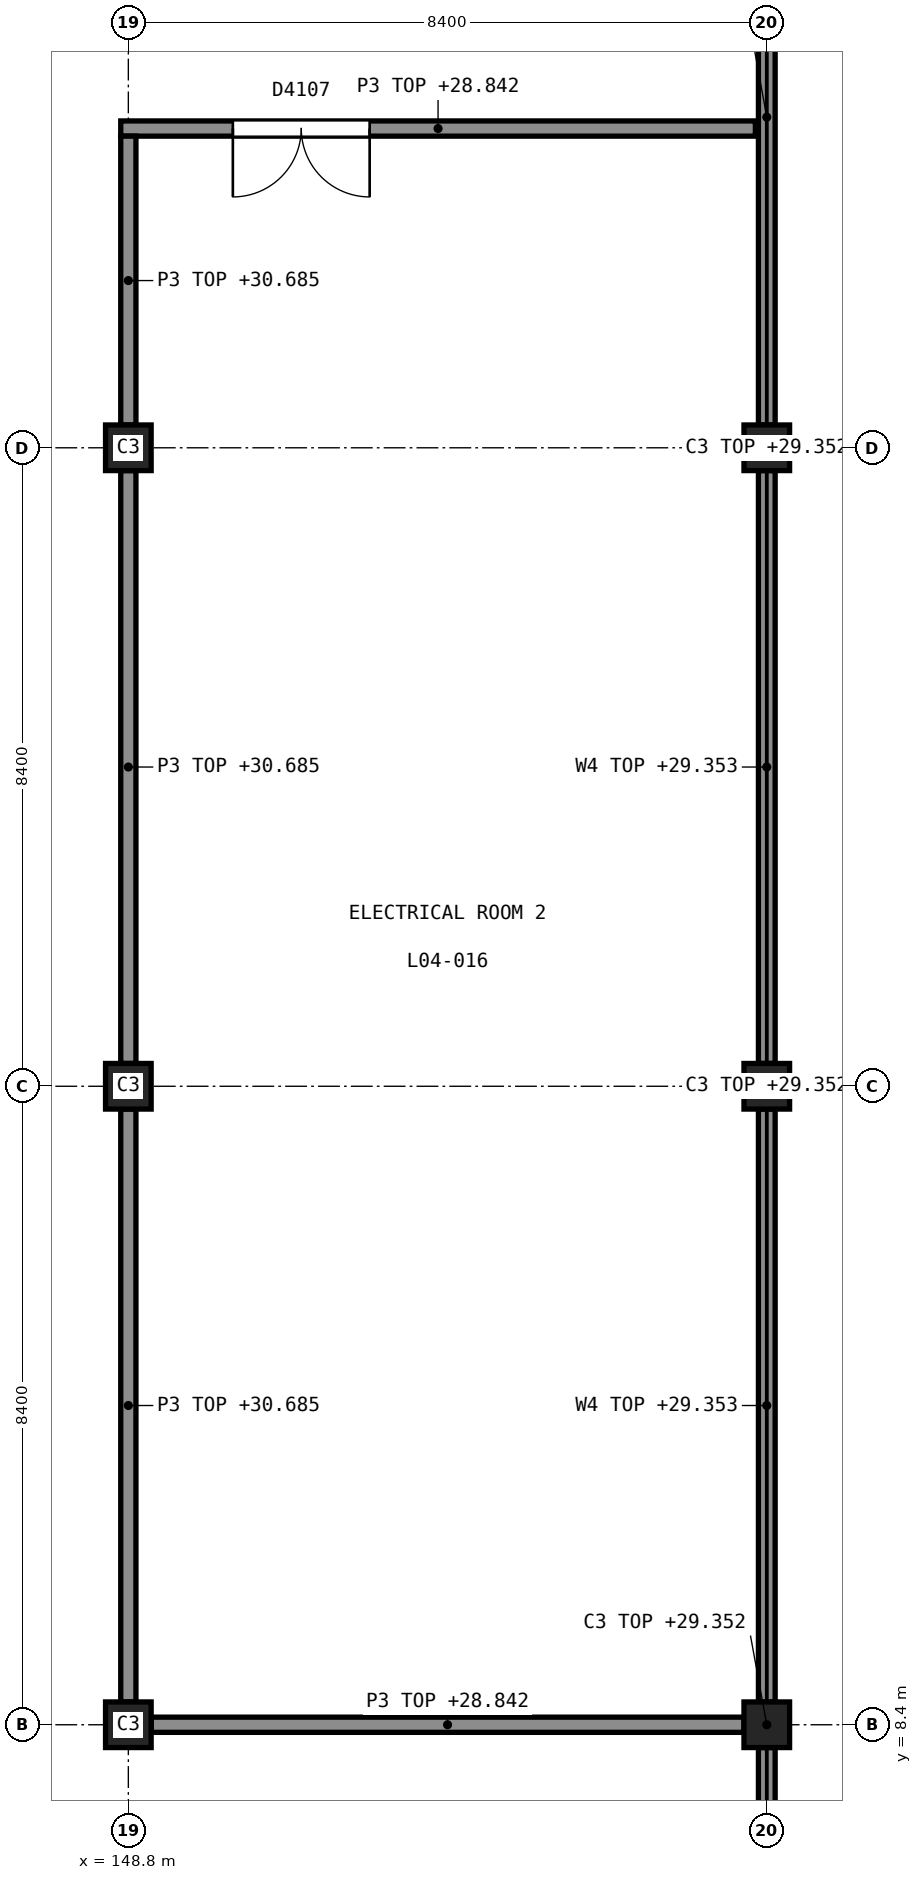
"""IFC4 building model, lengths in metres.
Left out: names, types, materials, properties, quantities, classifications, styles, units other than length and angle.
Written with IfcOpenShell. Run it as: python <this file> out.ifc"""

import sys

from ifc_helpers import new_model, si_unit, direction, frame, frame_2d, origin, origin_2d, place, context, subcontext, project, spatial, polyline, rectangle, outline, extrude, element, fill, save


model = new_model("IFC4")
c1 = context("Model", 3, precision=1e-05, world=origin(), true_north=direction((0.0, 1.0)))
c2 = subcontext(c1, "Body", "Model", "MODEL_VIEW")
j1 = project(units=[si_unit("LENGTHUNIT", "METRE"), si_unit("PLANEANGLEUNIT", "RADIAN")], contexts=[c1])
p1 = place(None, origin())
s1 = spatial("IfcSite", under=j1, at=p1, CompositionType="ELEMENT")
p2 = place(p1, origin())
s2 = spatial("IfcBuilding", under=s1, at=p2, CompositionType="ELEMENT")
p3 = place(p2, frame((0.0, 0.0, 25.0)))
s3 = spatial("IfcBuildingStorey", under=s2, at=p3, CompositionType="ELEMENT", Elevation=25.0)
for number, where, z_axis, x_axis in (
    (1, (148.8, 8.4, 0.0), (0.0, 0.0, 1.0), (1.0, 0.0, 0.0)),
    (2, (148.8, 16.8, 0.0), (0.0, 0.0, 1.0), (1.0, 0.0, 0.0)),
    (3, (148.8, 25.2, 0.0), (0.0, 0.0, 1.0), (1.0, 0.0, 0.0)),
):
    element("IfcColumn", number, at=place(p3, frame(where, z_axis=z_axis, x_axis=x_axis)), inside=s3, PredefinedType="COLUMN", context=c2, shape_type="SweptSolid", body=[
        extrude(rectangle(XDim=0.6, YDim=0.6, at=origin_2d()), origin(), (0.0, 0.0, 1.0), 5.0),
    ])
for number, where, z_axis, x_axis in (
    (4, (157.2, 8.4, 0.0), (0.0, 0.0, 1.0), (1.0, 0.0, 0.0)),
    (5, (157.2, 16.8, 0.0), (0.0, 0.0, 1.0), (1.0, 0.0, 0.0)),
    (6, (157.2, 25.2, 0.0), (0.0, 0.0, 1.0), (1.0, 0.0, 0.0)),
):
    element("IfcColumn", number, at=place(p3, frame(where, z_axis=z_axis, x_axis=x_axis)), inside=s3, PredefinedType="COLUMN", context=c2, shape_type="SweptSolid", body=[
        extrude(rectangle(XDim=0.6, YDim=0.6, at=origin_2d()), origin(), (0.0, 0.0, 1.0), 4.353),
    ])
for number, where, z_axis, x_axis in (
    (7, (157.2, 0.3, 0.0), (0.0, 0.0, 1.0), (0.0, 1.0, 0.0)),
    (8, (157.2, 8.7, 0.0), (0.0, 0.0, 1.0), (0.0, 1.0, 0.0)),
):
    element("IfcWall", number, at=place(p3, frame(where, z_axis=z_axis, x_axis=x_axis)), inside=s3, PredefinedType="SOLIDWALL", context=c2, shape_type="SweptSolid", body=[
        extrude(rectangle(XDim=7.8, YDim=0.22, at=frame_2d((3.9, 0.0))), origin(), (0.0, 0.0, 1.0), 4.353),
    ])
p4 = place(p3, frame((157.2, 17.1, 0.0), z_axis=(0.0, 0.0, 1.0), x_axis=(0.0, 1.0, 0.0)))
e9 = element("IfcWall", 9, at=p4, inside=s3, PredefinedType="SOLIDWALL", context=c2, shape_type="SweptSolid", body=[
    extrude(rectangle(XDim=7.8, YDim=0.22, at=frame_2d((3.9, 0.0))), origin(), (0.0, 0.0, 1.0), 4.353),
])
p5 = place(p3, frame((157.2, 25.5, 0.0), z_axis=(0.0, 0.0, 1.0), x_axis=(0.0, 1.0, 0.0)))
e10 = element("IfcWall", 10, at=p5, inside=s3, PredefinedType="SOLIDWALL", context=c2, shape_type="SweptSolid", body=[
    extrude(rectangle(XDim=8.1, YDim=0.22, at=frame_2d((4.05, 0.0))), origin(), (0.0, 0.0, 1.0), 4.353),
])
p6 = place(p3, frame((148.7, 29.4, 0.0), z_axis=(0.0, 0.0, 1.0), x_axis=(1.0, 0.0, 0.0)))
e11 = element("IfcWall", 11, at=p6, inside=s3, PredefinedType="PARTITIONING", context=c2, shape_type="SweptSolid", body=[
    extrude(rectangle(XDim=8.35, YDim=0.2, at=frame_2d((4.175, 0.0))), origin(), (0.0, 0.0, 1.0), 3.842),
])
p7 = place(p6, frame((1.475, 0.0, 0.0)))
e12 = element("IfcOpeningElement", 12, at=p7, cuts=e11, PredefinedType="OPENING", context=c2, shape_type="SweptSolid", body=[
    extrude(rectangle(XDim=1.8, YDim=2.1, at=frame_2d((0.9, 1.05))), frame((0.0, 0.11, 0.0), z_axis=(0.0, -1.0, 0.0), x_axis=(1.0, 0.0, 0.0)), (0.0, 0.0, 1.0), 0.22),
])
p8 = place(p3, frame((149.1, 8.4, 0.0), z_axis=(0.0, 0.0, 1.0), x_axis=(1.0, 0.0, 0.0)))
e13 = element("IfcWall", 13, at=p8, inside=s3, PredefinedType="PARTITIONING", context=c2, shape_type="SweptSolid", body=[
    extrude(rectangle(XDim=7.8, YDim=0.2, at=frame_2d((3.9, 0.0))), origin(), (0.0, 0.0, 1.0), 3.842),
])
p9 = place(p3, frame((148.8, 8.7, 0.0), z_axis=(0.0, 0.0, 1.0), x_axis=(0.0, 1.0, 0.0)))
e14 = element("IfcWall", 14, at=p9, inside=s3, PredefinedType="PARTITIONING", context=c2, shape_type="SweptSolid", body=[
    extrude(outline(polyline([(0.0, 0.0), (7.8, 0.0), (7.8, 5.685), (6.3, 5.685), (5.25, 3.842), (4.2, 5.685), (2.1, 5.685), (1.05, 3.842), (0.0, 5.685), (0.0, 0.0)])), frame((0.0, 0.1, 0.0), z_axis=(0.0, -1.0, 0.0), x_axis=(1.0, 0.0, 0.0)), (0.0, 0.0, 1.0), 0.2),
])
p10 = place(p3, frame((148.8, 17.1, 0.0), z_axis=(0.0, 0.0, 1.0), x_axis=(0.0, 1.0, 0.0)))
e15 = element("IfcWall", 15, at=p10, inside=s3, PredefinedType="PARTITIONING", context=c2, shape_type="SweptSolid", body=[
    extrude(outline(polyline([(0.0, 0.0), (7.8, 0.0), (7.8, 5.685), (6.3, 5.685), (5.25, 3.842), (4.2, 5.685), (2.1, 5.685), (1.05, 3.842), (0.0, 5.685), (0.0, 0.0)])), frame((0.0, 0.1, 0.0), z_axis=(0.0, -1.0, 0.0), x_axis=(1.0, 0.0, 0.0)), (0.0, 0.0, 1.0), 0.2),
])
p11 = place(p3, frame((148.8, 25.5, 0.0), z_axis=(0.0, 0.0, 1.0), x_axis=(0.0, 1.0, 0.0)))
e16 = element("IfcWall", 16, at=p11, inside=s3, PredefinedType="PARTITIONING", context=c2, shape_type="SweptSolid", body=[
    extrude(outline(polyline([(0.0, 0.0), (3.8, 0.0), (3.8, 5.685), (2.1, 5.685), (1.05, 3.842), (0.0, 5.685), (0.0, 0.0)])), frame((0.0, 0.1, 0.0), z_axis=(0.0, -1.0, 0.0), x_axis=(1.0, 0.0, 0.0)), (0.0, 0.0, 1.0), 0.2),
])
p12 = place(p7, origin())
e17 = element("IfcDoor", 17, at=p12, inside=s3, OperationType="DOUBLE_DOOR_SINGLE_SWING", PredefinedType="DOOR", context=c2, shape_type="SweptSolid", body=[
    extrude(rectangle(XDim=1.8, YDim=2.1, at=frame_2d((0.9, 1.05))), frame((0.0, 0.025, 0.0), z_axis=(0.0, -1.0, 0.0), x_axis=(1.0, 0.0, 0.0)), (0.0, 0.0, 1.0), 0.05),
])
fill(e12, e17)
save(model, sys.argv[1])
